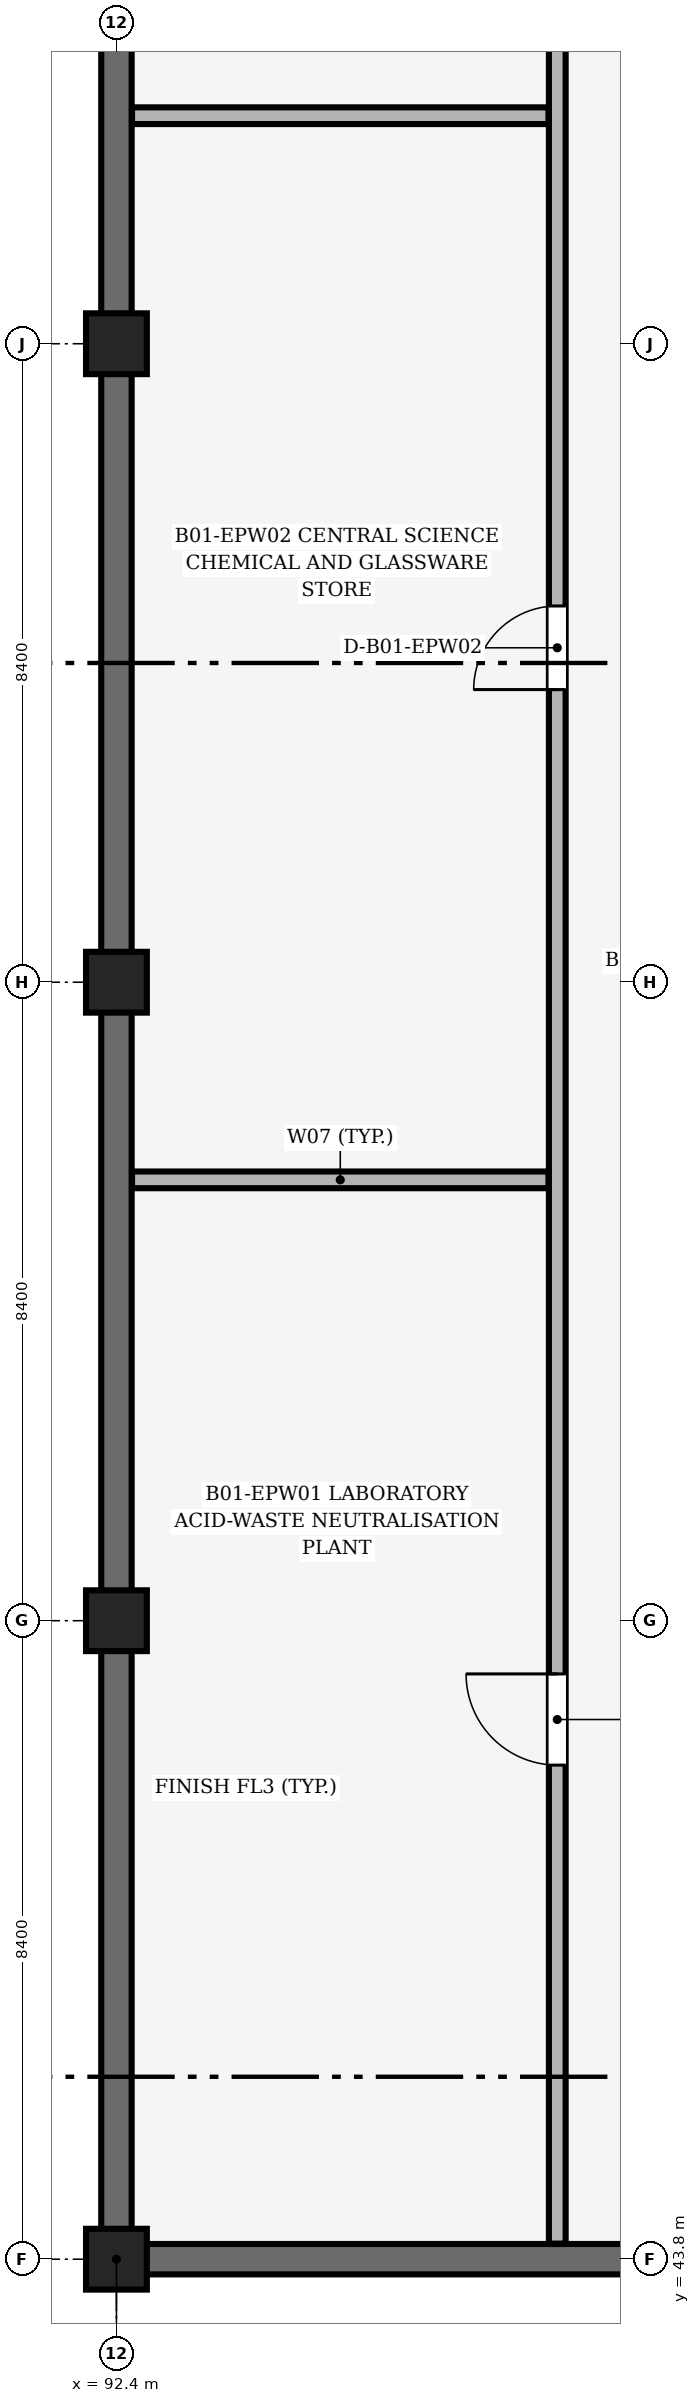
"""IFC4 building model, lengths in metres.
Left out: names, types, materials, properties, quantities, classifications, styles, units other than length and angle.
Written with IfcOpenShell. Run it as: python <this file> out.ifc"""

import sys

from ifc_helpers import new_model, si_unit, direction, frame, frame_2d, origin, origin_2d, place, context, subcontext, project, spatial, rectangle, extrude, element, fill, save


model = new_model("IFC4")
c1 = context("Model", 3, precision=1e-05, world=origin(), true_north=direction((0.0, 1.0)))
c2 = subcontext(c1, "Body", "Model", "MODEL_VIEW")
j1 = project(units=[si_unit("LENGTHUNIT", "METRE"), si_unit("PLANEANGLEUNIT", "RADIAN")], contexts=[c1])
p1 = place(None, origin())
s1 = spatial("IfcSite", under=j1, at=p1, CompositionType="ELEMENT")
p2 = place(p1, origin())
s2 = spatial("IfcBuilding", under=s1, at=p2, CompositionType="ELEMENT")
p3 = place(p2, frame((0.0, 0.0, -4.2)))
s3 = spatial("IfcBuildingStorey", under=s2, at=p3, CompositionType="ELEMENT", Elevation=-4.2)
for number, where, z_axis, x_axis in (
    (1, (92.4, 43.8, 0.0), (0.0, 0.0, 1.0), (1.0, 0.0, 0.0)),
    (2, (92.4, 52.2, 0.0), (0.0, 0.0, 1.0), (1.0, 0.0, 0.0)),
    (3, (92.4, 60.6, 0.0), (0.0, 0.0, 1.0), (1.0, 0.0, 0.0)),
    (4, (92.4, 69.0, 0.0), (0.0, 0.0, 1.0), (1.0, 0.0, 0.0)),
):
    element("IfcColumn", number, at=place(p3, frame(where, z_axis=z_axis, x_axis=x_axis)), inside=s3, PredefinedType="COLUMN", context=c2, shape_type="SweptSolid", body=[
        extrude(rectangle(XDim=0.8, YDim=0.8, at=origin_2d()), origin(), (0.0, 0.0, 1.0), 4.2),
    ])
p4 = place(p3, frame((92.4, 44.175, 0.0), z_axis=(0.0, 0.0, 1.0), x_axis=(0.0, 1.0, 0.0)))
e5 = element("IfcWall", 5, at=p4, inside=s3, PredefinedType="SHEAR", context=c2, shape_type="SweptSolid", body=[
    extrude(rectangle(XDim=7.65, YDim=0.4, at=frame_2d((3.825, 0.0))), origin(), (0.0, 0.0, 1.0), 3.15),
])
p5 = place(p3, frame((92.4, 52.575, 0.0), z_axis=(0.0, 0.0, 1.0), x_axis=(0.0, 1.0, 0.0)))
e6 = element("IfcWall", 6, at=p5, inside=s3, PredefinedType="SHEAR", context=c2, shape_type="SweptSolid", body=[
    extrude(rectangle(XDim=7.65, YDim=0.4, at=frame_2d((3.825, 0.0))), origin(), (0.0, 0.0, 1.0), 3.2),
])
p6 = place(p3, frame((92.4, 60.975, 0.0), z_axis=(0.0, 0.0, 1.0), x_axis=(0.0, 1.0, 0.0)))
e7 = element("IfcWall", 7, at=p6, inside=s3, PredefinedType="SHEAR", context=c2, shape_type="SweptSolid", body=[
    extrude(rectangle(XDim=7.65, YDim=0.4, at=frame_2d((3.825, 0.0))), origin(), (0.0, 0.0, 1.0), 3.15),
])
p7 = place(p3, frame((92.4, 69.375, 0.0), z_axis=(0.0, 0.0, 1.0), x_axis=(0.0, 1.0, 0.0)))
e8 = element("IfcWall", 8, at=p7, inside=s3, PredefinedType="SHEAR", context=c2, shape_type="SweptSolid", body=[
    extrude(rectangle(XDim=7.65, YDim=0.4, at=frame_2d((3.825, 0.0))), origin(), (0.0, 0.0, 1.0), 3.1),
])
p8 = place(p3, frame((92.775, 43.8, 0.0), z_axis=(0.0, 0.0, 1.0), x_axis=(1.0, 0.0, 0.0)))
e9 = element("IfcWall", 9, at=p8, inside=s3, PredefinedType="SHEAR", context=c2, shape_type="SweptSolid", body=[
    extrude(rectangle(XDim=7.65, YDim=0.4, at=frame_2d((3.825, 0.0))), origin(), (0.0, 0.0, 1.0), 3.25),
])
for number, where, z_axis, x_axis in (
    (10, (92.605, 58.0, 0.0), (0.0, 0.0, 1.0), (1.0, 0.0, 0.0)),
    (11, (92.605, 72.0, 0.0), (0.0, 0.0, 1.0), (1.0, 0.0, 0.0)),
):
    element("IfcWall", number, at=place(p3, frame(where, z_axis=z_axis, x_axis=x_axis)), inside=s3, PredefinedType="SOLIDWALL", context=c2, shape_type="SweptSolid", body=[
        extrude(rectangle(XDim=5.48, YDim=0.22, at=frame_2d((2.74, 0.0))), origin(), (0.0, 0.0, 1.0), 3.9),
    ])
p9 = place(p3, frame((98.2, 44.005, 0.0), z_axis=(0.0, 0.0, 1.0), x_axis=(0.0, 1.0, 0.0)))
e12 = element("IfcWall", 12, at=p9, inside=s3, PredefinedType="SOLIDWALL", context=c2, shape_type="SweptSolid", body=[
    extrude(rectangle(XDim=41.785, YDim=0.22, at=frame_2d((20.893, 0.0))), origin(), (0.0, 0.0, 1.0), 3.9),
])
p10 = place(p9, frame((6.295, 0.0, 0.0)))
e13 = element("IfcOpeningElement", 13, at=p10, cuts=e12, PredefinedType="OPENING", context=c2, shape_type="SweptSolid", body=[
    extrude(rectangle(XDim=1.2, YDim=2.4, at=frame_2d((0.6, 1.2))), frame((0.0, 0.12, 0.0), z_axis=(0.0, -1.0, 0.0), x_axis=(1.0, 0.0, 0.0)), (0.0, 0.0, 1.0), 0.24),
])
p11 = place(p9, frame((20.445, 0.0, 0.0)))
e14 = element("IfcOpeningElement", 14, at=p11, cuts=e12, PredefinedType="OPENING", context=c2, shape_type="SweptSolid", body=[
    extrude(rectangle(XDim=1.1, YDim=2.15, at=frame_2d((0.55, 1.075))), frame((0.0, 0.12, 0.0), z_axis=(0.0, -1.0, 0.0), x_axis=(1.0, 0.0, 0.0)), (0.0, 0.0, 1.0), 0.24),
])
p12 = place(p9, frame((34.345, 0.0, 0.0)))
e15 = element("IfcOpeningElement", 15, at=p12, cuts=e12, PredefinedType="OPENING", context=c2, shape_type="SweptSolid", body=[
    extrude(rectangle(XDim=1.1, YDim=2.15, at=frame_2d((0.55, 1.075))), frame((0.0, 0.12, 0.0), z_axis=(0.0, -1.0, 0.0), x_axis=(1.0, 0.0, 0.0)), (0.0, 0.0, 1.0), 0.24),
])
p13 = place(p10, origin())
e16 = element("IfcDoor", 16, at=p13, inside=s3, OperationType="SINGLE_SWING_RIGHT", PredefinedType="DOOR", context=c2, shape_type="SweptSolid", body=[
    extrude(rectangle(XDim=1.2, YDim=2.4, at=frame_2d((0.6, 1.2))), frame((0.0, 0.025, 0.0), z_axis=(0.0, -1.0, 0.0), x_axis=(1.0, 0.0, 0.0)), (0.0, 0.0, 1.0), 0.05),
])
fill(e13, e16)
p14 = place(p11, origin())
e17 = element("IfcDoor", 17, at=p14, inside=s3, OperationType="SINGLE_SWING_LEFT", PredefinedType="DOOR", context=c2, shape_type="SweptSolid", body=[
    extrude(rectangle(XDim=1.1, YDim=2.15, at=frame_2d((0.55, 1.075))), frame((0.0, 0.025, 0.0), z_axis=(0.0, -1.0, 0.0), x_axis=(1.0, 0.0, 0.0)), (0.0, 0.0, 1.0), 0.05),
])
fill(e14, e17)
save(model, sys.argv[1])
